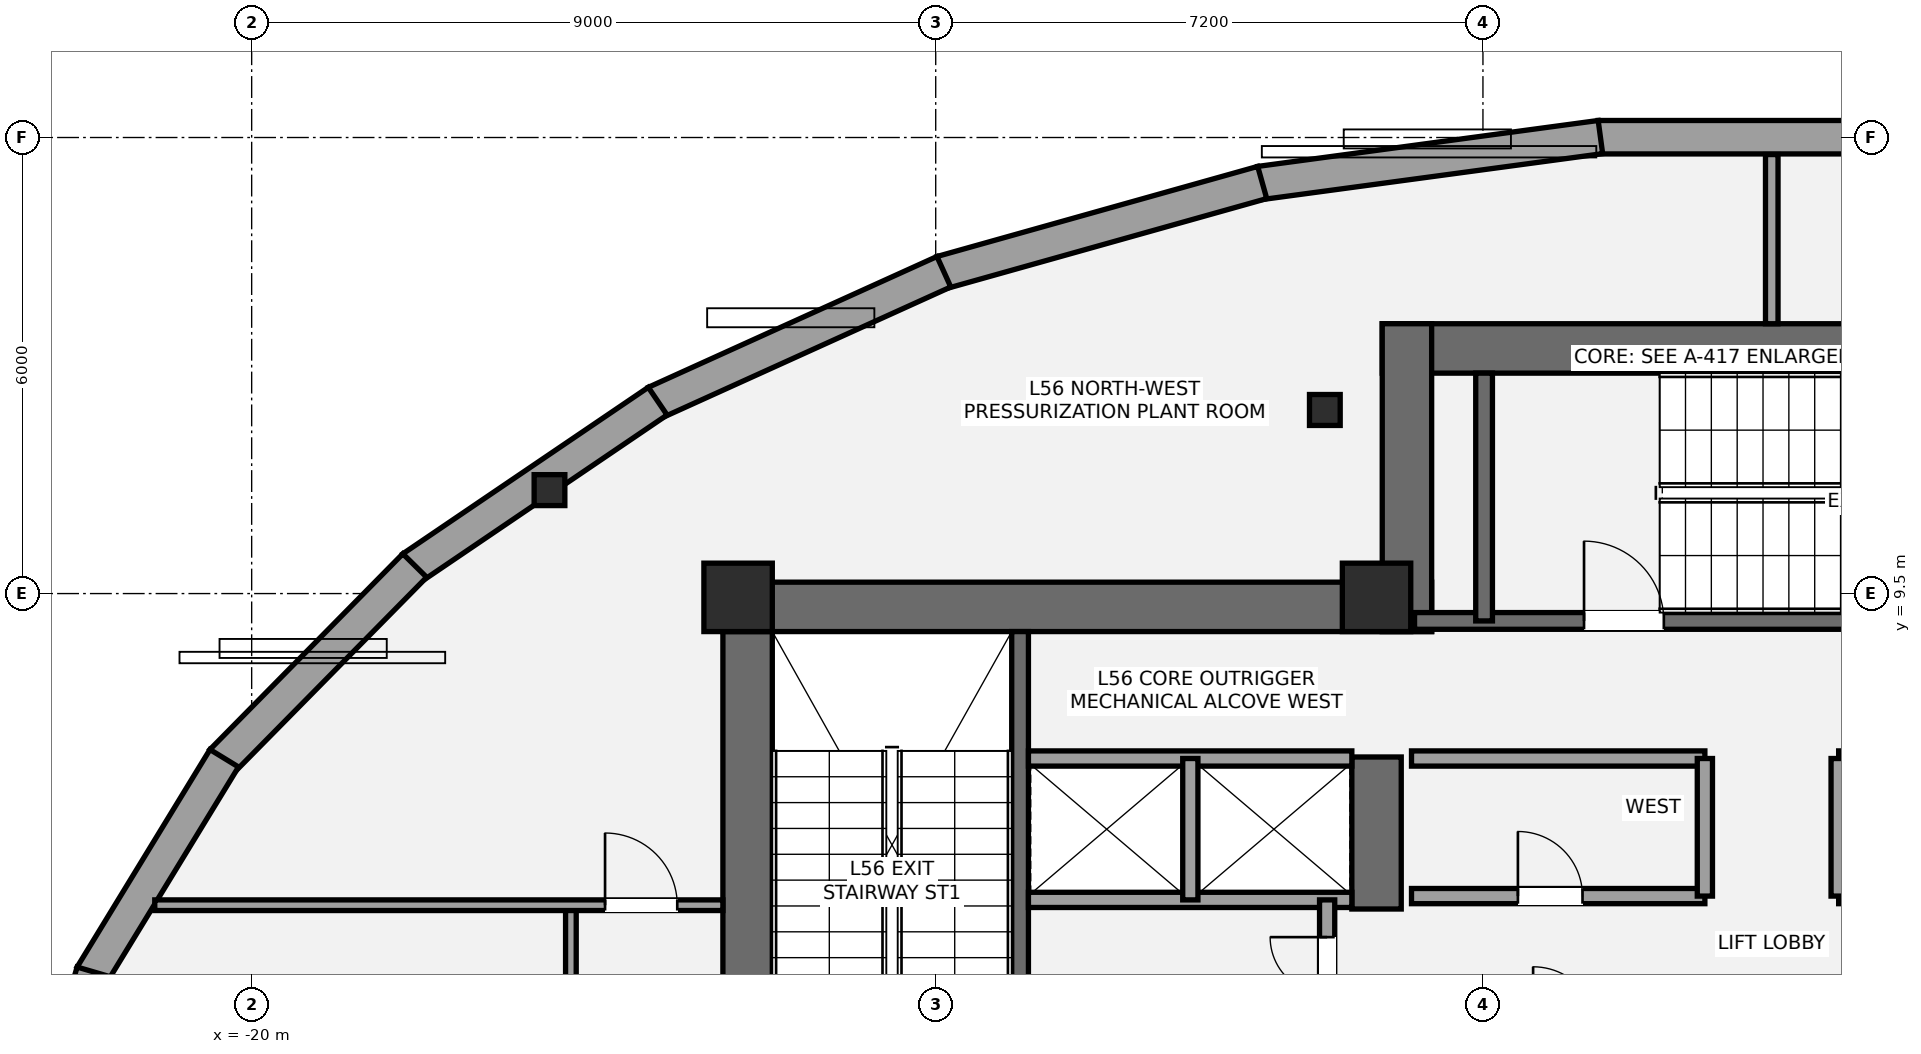
"""IFC4 building model, lengths in metres.
Left out: names, types, materials, properties, quantities, classifications, styles, units other than length and angle.
Written with IfcOpenShell. Run it as: python <this file> out.ifc"""

import sys

from ifc_helpers import new_model, si_unit, direction, frame, frame_2d, origin, origin_2d, place, context, subcontext, project, spatial, rectangle, i_section, extrude, element, fill, save


model = new_model("IFC4")
c1 = context("Model", 3, precision=1e-05, world=origin(), true_north=direction((0.0, 1.0)))
c2 = subcontext(c1, "Body", "Model", "MODEL_VIEW")
j1 = project(units=[si_unit("LENGTHUNIT", "METRE"), si_unit("PLANEANGLEUNIT", "RADIAN")], contexts=[c1])
p1 = place(None, origin())
s1 = spatial("IfcSite", under=j1, at=p1, CompositionType="ELEMENT")
p2 = place(p1, origin())
s2 = spatial("IfcBuilding", under=s1, at=p2, CompositionType="ELEMENT")
p3 = place(p2, frame((0.0, 0.0, 201.4)))
s3 = spatial("IfcBuildingStorey", under=s2, at=p3, CompositionType="ELEMENT", Elevation=201.4)
p4 = place(p3, frame((-13.475, 1.2, 0.0), z_axis=(0.0, 0.0, 1.0), x_axis=(0.0, 1.0, 0.0)))
e1 = element("IfcWall", 1, at=p4, inside=s3, PredefinedType="SHEAR", context=c2, shape_type="SweptSolid", body=[
    extrude(rectangle(XDim=8.45, YDim=0.65, at=frame_2d((4.225, 0.0))), origin(), (0.0, 0.0, 1.0), 4.5),
])
p5 = place(p3, frame((-13.8, 9.325, 0.0), z_axis=(0.0, 0.0, 1.0), x_axis=(1.0, 0.0, 0.0)))
e2 = element("IfcWall", 2, at=p5, inside=s3, PredefinedType="SHEAR", context=c2, shape_type="SweptSolid", body=[
    extrude(rectangle(XDim=9.325, YDim=0.65, at=frame_2d((4.663, 0.0))), origin(), (0.0, 0.0, 1.0), 4.5),
])
p6 = place(p3, frame((-5.2, 5.35, 0.0), z_axis=(0.0, 0.0, 1.0), x_axis=(0.0, 1.0, 0.0)))
e3 = element("IfcWall", 3, at=p6, inside=s3, PredefinedType="SHEAR", context=c2, shape_type="SweptSolid", body=[
    extrude(rectangle(XDim=2.0, YDim=0.65, at=frame_2d((1.0, 0.0))), origin(), (0.0, 0.0, 1.0), 4.5),
])
p7 = place(p3, frame((-9.89, 1.85, 0.0), z_axis=(0.0, 0.0, 1.0), x_axis=(0.0, 1.0, 0.0)))
e4 = element("IfcWall", 4, at=p7, inside=s3, PredefinedType="SHEAR", context=c2, shape_type="SweptSolid", body=[
    extrude(rectangle(XDim=7.15, YDim=0.22, at=frame_2d((3.575, 0.0))), origin(), (0.0, 0.0, 1.0), 4.5),
])
p8 = place(p3, frame((-5.125, 12.725, 0.0), z_axis=(0.0, 0.0, 1.0), x_axis=(1.0, 0.0, 0.0)))
e5 = element("IfcWall", 5, at=p8, inside=s3, PredefinedType="SHEAR", context=c2, shape_type="SweptSolid", body=[
    extrude(rectangle(XDim=10.25, YDim=0.65, at=frame_2d((5.125, 0.0))), origin(), (0.0, 0.0, 1.0), 4.5),
])
p9 = place(p3, frame((-4.8, 9.0, 0.0), z_axis=(0.0, 0.0, 1.0), x_axis=(0.0, 1.0, 0.0)))
e6 = element("IfcWall", 6, at=p9, inside=s3, PredefinedType="SHEAR", context=c2, shape_type="SweptSolid", body=[
    extrude(rectangle(XDim=4.05, YDim=0.65, at=frame_2d((2.025, 0.0))), origin(), (0.0, 0.0, 1.0), 4.5),
])
p10 = place(p3, frame((-4.7, 9.14, 0.0), z_axis=(0.0, 0.0, 1.0), x_axis=(1.0, 0.0, 0.0)))
e7 = element("IfcWall", 7, at=p10, inside=s3, PredefinedType="SHEAR", context=c2, shape_type="SweptSolid", body=[
    extrude(rectangle(XDim=9.3, YDim=0.22, at=frame_2d((4.65, 0.0))), origin(), (0.0, 0.0, 1.0), 4.5),
])
p11 = place(p10, frame((2.23, 0.0, 0.0)))
e8 = element("IfcOpeningElement", 8, at=p11, cuts=e7, PredefinedType="OPENING", context=c2, shape_type="SweptSolid", body=[
    extrude(rectangle(XDim=1.05, YDim=2.15, at=frame_2d((0.525, 1.075))), frame((0.0, 0.12, 0.0), z_axis=(0.0, -1.0, 0.0), x_axis=(1.0, 0.0, 0.0)), (0.0, 0.0, 1.0), 0.24),
])
p12 = place(p3, frame((-3.785, 9.14, 0.0), z_axis=(0.0, 0.0, 1.0), x_axis=(0.0, 1.0, 0.0)))
e9 = element("IfcWall", 9, at=p12, inside=s3, PredefinedType="SHEAR", context=c2, shape_type="SweptSolid", body=[
    extrude(rectangle(XDim=3.26, YDim=0.22, at=frame_2d((1.63, 0.0))), origin(), (0.0, 0.0, 1.0), 4.5),
])
for number, where, z_axis, x_axis in (
    (10, (-13.6, 9.45, 0.0), (0.0, 0.0, 1.0), (1.0, 0.0, 0.0)),
    (11, (-5.2, 9.45, 0.0), (0.0, 0.0, 1.0), (1.0, 0.0, 0.0)),
):
    element("IfcColumn", number, at=place(p3, frame(where, z_axis=z_axis, x_axis=x_axis)), inside=s3, PredefinedType="COLUMN", context=c2, shape_type="SweptSolid", body=[
        extrude(rectangle(XDim=0.9, YDim=0.9, at=origin_2d()), origin(), (0.0, 0.0, 1.0), 4.5),
    ])
for number, where, z_axis, x_axis in (
    (12, (-5.88, 11.915, 0.0), (0.0, 0.0, 1.0), (1.0, 0.0, 0.0)),
    (13, (-16.082, 10.861, 0.0), (0.0, 0.0, 1.0), (1.0, 0.0, 0.0)),
):
    element("IfcColumn", number, at=place(p3, frame(where, z_axis=z_axis, x_axis=x_axis)), inside=s3, PredefinedType="COLUMN", context=c2, shape_type="SweptSolid", body=[
        extrude(i_section(OverallWidth=0.404, OverallDepth=0.407, WebThickness=0.027, FlangeThickness=0.044, at=origin_2d()), origin(), (0.0, 0.0, 1.0), 4.5),
    ])
p13 = place(p3, frame((-2.284, 15.504, 0.0), z_axis=(0.0, 0.0, 1.0), x_axis=(1.0, 0.0, 0.0)))
e14 = element("IfcWall", 14, at=p13, inside=s3, PredefinedType="STANDARD", context=c2, shape_type="SweptSolid", body=[
    extrude(rectangle(XDim=4.567, YDim=0.44, at=frame_2d((2.284, 0.0))), origin(), (0.0, 0.0, 1.0), 3.575),
])
p14 = place(p3, frame((-6.734, 14.902, 0.0), z_axis=(0.0, 0.0, 1.0), x_axis=(0.991025333234, 0.133674189316, 0.0)))
e15 = element("IfcWall", 15, at=p14, inside=s3, PredefinedType="STANDARD", context=c2, shape_type="SweptSolid", body=[
    extrude(rectangle(XDim=4.52, YDim=0.44, at=frame_2d((2.26, 0.0))), origin(), (0.0, 0.0, 1.0), 3.575),
])
p15 = place(p3, frame((-10.924, 13.723, 0.0), z_axis=(0.0, 0.0, 1.0), x_axis=(0.962743881764, 0.270414899969, 0.0)))
e16 = element("IfcWall", 16, at=p15, inside=s3, PredefinedType="STANDARD", context=c2, shape_type="SweptSolid", body=[
    extrude(rectangle(XDim=4.383, YDim=0.44, at=frame_2d((2.192, 0.0))), origin(), (0.0, 0.0, 1.0), 3.575),
])
p16 = place(p3, frame((-14.691, 12.013, 0.0), z_axis=(0.0, 0.0, 1.0), x_axis=(0.910881102331, 0.412668895624, 0.0)))
e17 = element("IfcWall", 17, at=p16, inside=s3, PredefinedType="STANDARD", context=c2, shape_type="SweptSolid", body=[
    extrude(rectangle(XDim=4.17, YDim=0.44, at=frame_2d((2.085, 0.0))), origin(), (0.0, 0.0, 1.0), 3.575),
])
p17 = place(p3, frame((-17.888, 9.841, 0.0), z_axis=(0.0, 0.0, 1.0), x_axis=(0.827644957237, 0.561252015373, 0.0)))
e18 = element("IfcWall", 18, at=p17, inside=s3, PredefinedType="STANDARD", context=c2, shape_type="SweptSolid", body=[
    extrude(rectangle(XDim=3.902, YDim=0.44, at=frame_2d((1.951, 0.0))), origin(), (0.0, 0.0, 1.0), 3.575),
])
p18 = place(p3, frame((-20.392, 7.294, 0.0), z_axis=(0.0, 0.0, 1.0), x_axis=(0.701887992659, 0.712287333708, 0.0)))
e19 = element("IfcWall", 19, at=p18, inside=s3, PredefinedType="STANDARD", context=c2, shape_type="SweptSolid", body=[
    extrude(rectangle(XDim=3.615, YDim=0.44, at=frame_2d((1.808, 0.0))), origin(), (0.0, 0.0, 1.0), 3.575),
])
p19 = place(p3, frame((-22.109, 4.472, 0.0), z_axis=(0.0, 0.0, 1.0), x_axis=(0.521214394333, 0.853425775999, 0.0)))
e20 = element("IfcWall", 20, at=p19, inside=s3, PredefinedType="STANDARD", context=c2, shape_type="SweptSolid", body=[
    extrude(rectangle(XDim=3.353, YDim=0.44, at=frame_2d((1.677, 0.0))), origin(), (0.0, 0.0, 1.0), 3.575),
])
p20 = place(p3, frame((-22.977, 1.487, 0.0), z_axis=(0.0, 0.0, 1.0), x_axis=(0.281477355005, 0.959567870773, 0.0)))
e21 = element("IfcWall", 21, at=p20, inside=s3, PredefinedType="STANDARD", context=c2, shape_type="SweptSolid", body=[
    extrude(rectangle(XDim=3.166, YDim=0.44, at=frame_2d((1.583, 0.0))), origin(), (0.0, 0.0, 1.0), 3.575),
])
for number, where, z_axis, x_axis in (
    (22, (-9.78, 5.47, 0.0), (0.0, 0.0, 1.0), (1.0, 0.0, 0.0)),
    (23, (-9.78, 7.33, 0.0), (0.0, 0.0, 1.0), (1.0, 0.0, 0.0)),
):
    element("IfcWall", number, at=place(p3, frame(where, z_axis=z_axis, x_axis=x_axis)), inside=s3, PredefinedType="SOLIDWALL", context=c2, shape_type="SweptSolid", body=[
        extrude(rectangle(XDim=4.255, YDim=0.2, at=frame_2d((2.127, 0.0))), origin(), (0.0, 0.0, 1.0), 4.28),
    ])
p21 = place(p3, frame((-7.65, 5.47, 0.0), z_axis=(0.0, 0.0, 1.0), x_axis=(0.0, 1.0, 0.0)))
e24 = element("IfcWall", 24, at=p21, inside=s3, PredefinedType="SOLIDWALL", context=c2, shape_type="SweptSolid", body=[
    extrude(rectangle(XDim=1.86, YDim=0.2, at=frame_2d((0.93, 0.0))), origin(), (0.0, 0.0, 1.0), 4.28),
])
p22 = place(p3, frame((-5.85, 3.78, 0.0), z_axis=(0.0, 0.0, 1.0), x_axis=(0.0, 1.0, 0.0)))
e25 = element("IfcWall", 25, at=p22, inside=s3, PredefinedType="SOLIDWALL", context=c2, shape_type="SweptSolid", body=[
    extrude(rectangle(XDim=1.69, YDim=0.2, at=frame_2d((0.845, 0.0))), origin(), (0.0, 0.0, 1.0), 4.28),
])
p23 = place(p22, frame((0.45, 0.0, 0.0)))
e26 = element("IfcOpeningElement", 26, at=p23, cuts=e25, PredefinedType="OPENING", context=c2, shape_type="SweptSolid", body=[
    extrude(rectangle(XDim=0.75, YDim=2.1, at=frame_2d((0.375, 1.05))), frame((0.0, 0.11, 0.0), z_axis=(0.0, -1.0, 0.0), x_axis=(1.0, 0.0, 0.0)), (0.0, 0.0, 1.0), 0.22),
])
p24 = place(p3, frame((-4.74, 5.52, 0.0), z_axis=(0.0, 0.0, 1.0), x_axis=(1.0, 0.0, 0.0)))
e27 = element("IfcWall", 27, at=p24, inside=s3, PredefinedType="SOLIDWALL", context=c2, shape_type="SweptSolid", body=[
    extrude(rectangle(XDim=3.86, YDim=0.2, at=frame_2d((1.93, 0.0))), origin(), (0.0, 0.0, 1.0), 4.28),
])
p25 = place(p24, frame((1.4, 0.0, 0.0)))
e28 = element("IfcOpeningElement", 28, at=p25, cuts=e27, PredefinedType="OPENING", context=c2, shape_type="SweptSolid", body=[
    extrude(rectangle(XDim=0.85, YDim=2.1, at=frame_2d((0.425, 1.05))), frame((0.0, 0.11, 0.0), z_axis=(0.0, -1.0, 0.0), x_axis=(1.0, 0.0, 0.0)), (0.0, 0.0, 1.0), 0.22),
])
p26 = place(p3, frame((0.88, 5.52, 0.0), z_axis=(0.0, 0.0, 1.0), x_axis=(1.0, 0.0, 0.0)))
e29 = element("IfcWall", 29, at=p26, inside=s3, PredefinedType="SOLIDWALL", context=c2, shape_type="SweptSolid", body=[
    extrude(rectangle(XDim=3.86, YDim=0.2, at=frame_2d((1.93, 0.0))), origin(), (0.0, 0.0, 1.0), 4.28),
])
p27 = place(p26, frame((1.4, 0.0, 0.0)))
e30 = element("IfcOpeningElement", 30, at=p27, cuts=e29, PredefinedType="OPENING", context=c2, shape_type="SweptSolid", body=[
    extrude(rectangle(XDim=0.85, YDim=2.1, at=frame_2d((0.425, 1.05))), frame((0.0, 0.11, 0.0), z_axis=(0.0, -1.0, 0.0), x_axis=(1.0, 0.0, 0.0)), (0.0, 0.0, 1.0), 0.22),
])
for number, where, z_axis, x_axis in (
    (31, (-4.74, 7.33, 0.0), (0.0, 0.0, 1.0), (1.0, 0.0, 0.0)),
    (32, (0.88, 7.33, 0.0), (0.0, 0.0, 1.0), (1.0, 0.0, 0.0)),
):
    element("IfcWall", number, at=place(p3, frame(where, z_axis=z_axis, x_axis=x_axis)), inside=s3, PredefinedType="SOLIDWALL", context=c2, shape_type="SweptSolid", body=[
        extrude(rectangle(XDim=3.86, YDim=0.2, at=frame_2d((1.93, 0.0))), origin(), (0.0, 0.0, 1.0), 4.28),
    ])
for number, where, z_axis, x_axis in (
    (33, (-0.88, 5.52, 0.0), (0.0, 0.0, 1.0), (0.0, 1.0, 0.0)),
    (34, (0.88, 5.52, 0.0), (0.0, 0.0, 1.0), (0.0, 1.0, 0.0)),
):
    element("IfcWall", number, at=place(p3, frame(where, z_axis=z_axis, x_axis=x_axis)), inside=s3, PredefinedType="SOLIDWALL", context=c2, shape_type="SweptSolid", body=[
        extrude(rectangle(XDim=1.81, YDim=0.2, at=frame_2d((0.905, 0.0))), origin(), (0.0, 0.0, 1.0), 4.28),
    ])
p28 = place(p3, frame((-15.8, -6.85, 0.0), z_axis=(0.0, 0.0, 1.0), x_axis=(0.0, 1.0, 0.0)))
e35 = element("IfcWall", 35, at=p28, inside=s3, PredefinedType="PARTITIONING", context=c2, shape_type="SweptSolid", body=[
    extrude(rectangle(XDim=12.25, YDim=0.14, at=frame_2d((6.125, 0.0))), origin(), (0.0, 0.0, 1.0), 2.47),
])
p29 = place(p28, frame((0.35, 0.0, 0.0)))
e36 = element("IfcOpeningElement", 36, at=p29, cuts=e35, PredefinedType="OPENING", context=c2, shape_type="SweptSolid", body=[
    extrude(rectangle(XDim=0.95, YDim=2.15, at=frame_2d((0.475, 1.075))), frame((0.0, 0.08, 0.0), z_axis=(0.0, -1.0, 0.0), x_axis=(1.0, 0.0, 0.0)), (0.0, 0.0, 1.0), 0.16),
])
p30 = place(p28, frame((2.86, 0.0, 0.0)))
e37 = element("IfcOpeningElement", 37, at=p30, cuts=e35, PredefinedType="OPENING", context=c2, shape_type="SweptSolid", body=[
    extrude(rectangle(XDim=0.95, YDim=2.15, at=frame_2d((0.475, 1.075))), frame((0.0, 0.08, 0.0), z_axis=(0.0, -1.0, 0.0), x_axis=(1.0, 0.0, 0.0)), (0.0, 0.0, 1.0), 0.16),
])
p31 = place(p3, frame((-21.275, 5.4, 0.0), z_axis=(0.0, 0.0, 1.0), x_axis=(1.0, 0.0, 0.0)))
e38 = element("IfcWall", 38, at=p31, inside=s3, PredefinedType="PARTITIONING", context=c2, shape_type="SweptSolid", body=[
    extrude(rectangle(XDim=7.475, YDim=0.14, at=frame_2d((3.737, 0.0))), origin(), (0.0, 0.0, 1.0), 3.733),
])
p32 = place(p31, frame((5.924, 0.0, 0.0)))
e39 = element("IfcOpeningElement", 39, at=p32, cuts=e38, PredefinedType="OPENING", context=c2, shape_type="SweptSolid", body=[
    extrude(rectangle(XDim=0.95, YDim=2.15, at=frame_2d((0.475, 1.075))), frame((0.0, 0.08, 0.0), z_axis=(0.0, -1.0, 0.0), x_axis=(1.0, 0.0, 0.0)), (0.0, 0.0, 1.0), 0.16),
])
p33 = place(p3, frame((0.0, 13.05, 0.0), z_axis=(0.0, 0.0, 1.0), x_axis=(0.0, 1.0, 0.0)))
e40 = element("IfcWall", 40, at=p33, inside=s3, PredefinedType="PARTITIONING", context=c2, shape_type="SweptSolid", body=[
    extrude(rectangle(XDim=2.226, YDim=0.165, at=frame_2d((1.113, 0.0))), origin(), (0.0, 0.0, 1.0), 4.28),
])
p34 = place(p11, origin())
e41 = element("IfcDoor", 41, at=p34, inside=s3, OperationType="SINGLE_SWING_LEFT", PredefinedType="DOOR", context=c2, shape_type="SweptSolid", body=[
    extrude(rectangle(XDim=1.05, YDim=2.15, at=frame_2d((0.525, 1.075))), frame((0.0, 0.025, 0.0), z_axis=(0.0, -1.0, 0.0), x_axis=(1.0, 0.0, 0.0)), (0.0, 0.0, 1.0), 0.05),
])
fill(e8, e41)
p35 = place(p23, origin())
e42 = element("IfcDoor", 42, at=p35, inside=s3, OperationType="SINGLE_SWING_RIGHT", PredefinedType="DOOR", context=c2, shape_type="SweptSolid", body=[
    extrude(rectangle(XDim=0.75, YDim=2.1, at=frame_2d((0.375, 1.05))), frame((0.0, 0.025, 0.0), z_axis=(0.0, -1.0, 0.0), x_axis=(1.0, 0.0, 0.0)), (0.0, 0.0, 1.0), 0.05),
])
fill(e26, e42)
p36 = place(p25, origin())
e43 = element("IfcDoor", 43, at=p36, inside=s3, OperationType="SINGLE_SWING_LEFT", PredefinedType="DOOR", context=c2, shape_type="SweptSolid", body=[
    extrude(rectangle(XDim=0.85, YDim=2.1, at=frame_2d((0.425, 1.05))), frame((0.0, 0.025, 0.0), z_axis=(0.0, -1.0, 0.0), x_axis=(1.0, 0.0, 0.0)), (0.0, 0.0, 1.0), 0.05),
])
fill(e28, e43)
p37 = place(p32, origin())
e44 = element("IfcDoor", 44, at=p37, inside=s3, OperationType="SINGLE_SWING_LEFT", PredefinedType="DOOR", context=c2, shape_type="SweptSolid", body=[
    extrude(rectangle(XDim=0.95, YDim=2.15, at=frame_2d((0.475, 1.075))), frame((0.0, 0.025, 0.0), z_axis=(0.0, -1.0, 0.0), x_axis=(1.0, 0.0, 0.0)), (0.0, 0.0, 1.0), 0.05),
])
fill(e39, e44)
save(model, sys.argv[1])
